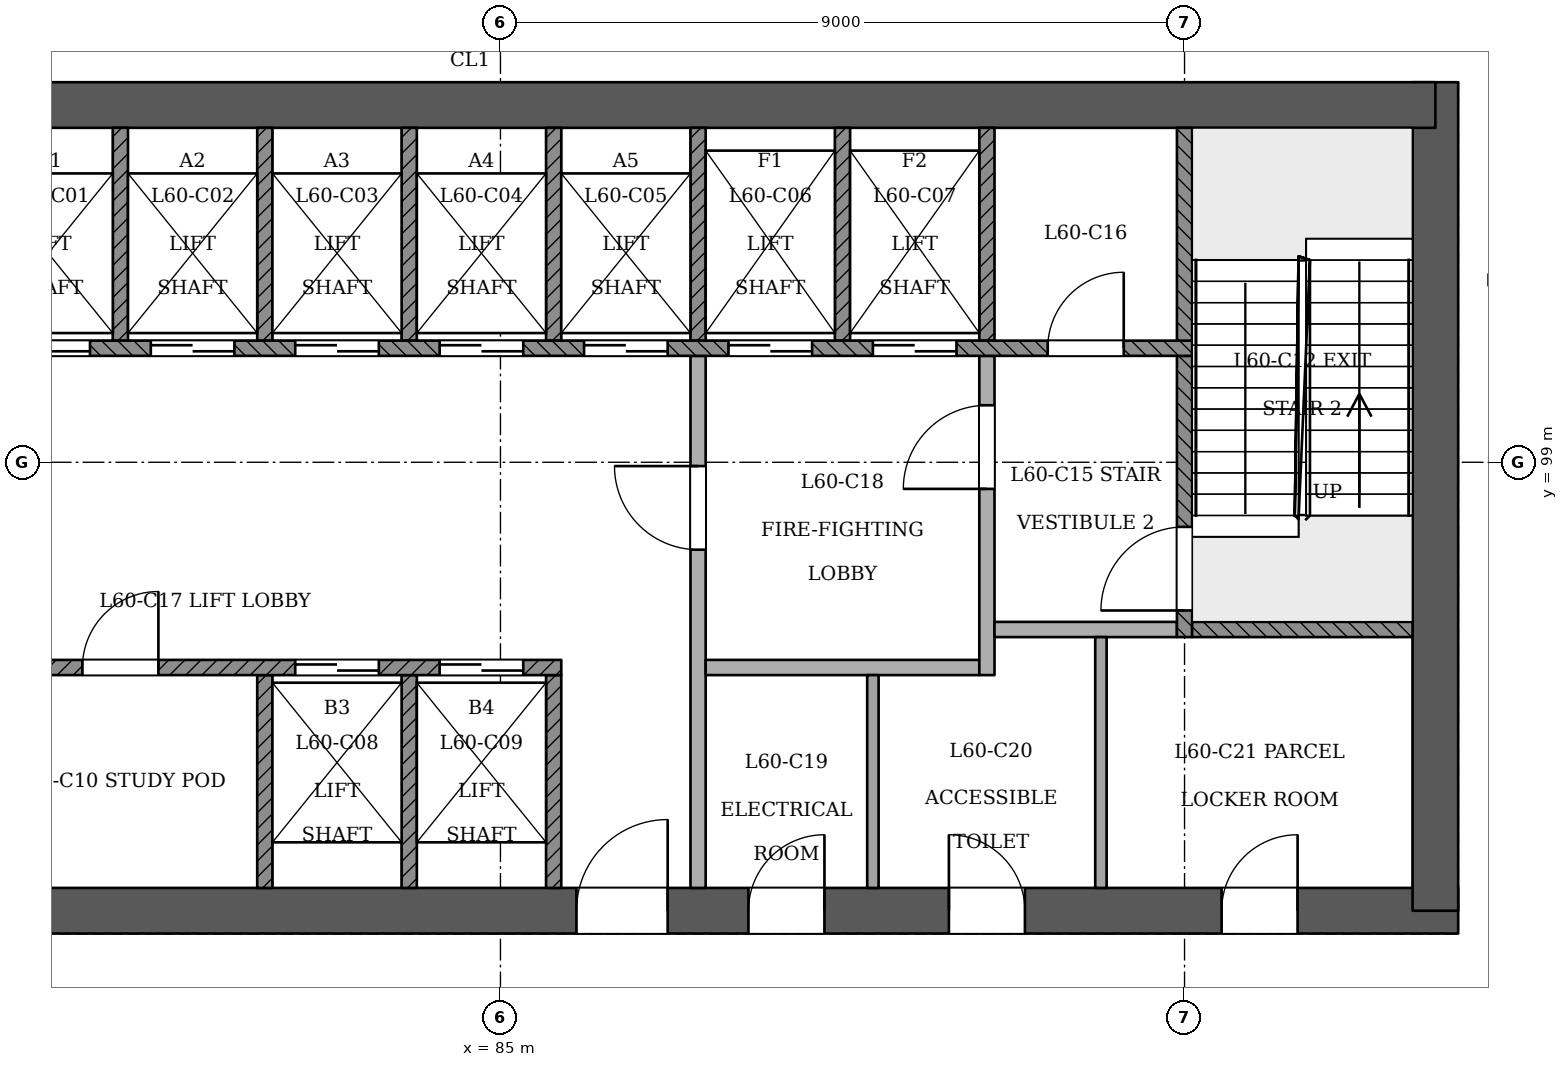
"""IFC4 building model, lengths in metres.
Left out: names, types, materials, properties, quantities, classifications, styles, units other than length and angle.
Written with IfcOpenShell. Run it as: python <this file> out.ifc"""

import sys

from ifc_helpers import new_model, si_unit, direction, frame, frame_2d, origin, place, context, subcontext, project, spatial, rectangle, extrude, element, fill, save


model = new_model("IFC4")
c1 = context("Model", 3, precision=1e-05, world=origin(), true_north=direction((0.0, 1.0)))
c2 = subcontext(c1, "Body", "Model", "MODEL_VIEW")
j1 = project(units=[si_unit("LENGTHUNIT", "METRE"), si_unit("PLANEANGLEUNIT", "RADIAN")], contexts=[c1])
p1 = place(None, origin())
s1 = spatial("IfcSite", under=j1, at=p1, CompositionType="ELEMENT")
p2 = place(p1, origin())
s2 = spatial("IfcBuilding", under=s1, at=p2, CompositionType="ELEMENT")
p3 = place(p2, frame((0.0, 0.0, 233.8)))
s3 = spatial("IfcBuildingStorey", under=s2, at=p3, CompositionType="ELEMENT", Elevation=233.8)
p4 = place(p3, frame((72.7, 93.1, 0.0), z_axis=(0.0, 0.0, 1.0), x_axis=(1.0, 0.0, 0.0)))
e1 = element("IfcWall", 1, at=p4, inside=s3, PredefinedType="SHEAR", context=c2, shape_type="SweptSolid", body=[
    extrude(rectangle(XDim=24.9, YDim=0.6, at=frame_2d((12.45, 0.0))), origin(), (0.0, 0.0, 1.0), 5.4),
])
p5 = place(p4, frame((1.1, 0.0, 0.0)))
e2 = element("IfcOpeningElement", 2, at=p5, cuts=e1, PredefinedType="OPENING", context=c2, shape_type="SweptSolid", body=[
    extrude(rectangle(XDim=1.2, YDim=2.1, at=frame_2d((0.6, 1.05))), frame((0.0, 0.311, 0.0), z_axis=(0.0, -1.0, 0.0), x_axis=(1.0, 0.0, 0.0)), (0.0, 0.0, 1.0), 0.621),
])
p6 = place(p4, frame((3.3, 0.0, 0.0)))
e3 = element("IfcOpeningElement", 3, at=p6, cuts=e1, PredefinedType="OPENING", context=c2, shape_type="SweptSolid", body=[
    extrude(rectangle(XDim=1.2, YDim=2.1, at=frame_2d((0.6, 1.05))), frame((0.0, 0.311, 0.0), z_axis=(0.0, -1.0, 0.0), x_axis=(1.0, 0.0, 0.0)), (0.0, 0.0, 1.0), 0.621),
])
p7 = place(p4, frame((13.3, 0.0, 0.0)))
e4 = element("IfcOpeningElement", 4, at=p7, cuts=e1, PredefinedType="OPENING", context=c2, shape_type="SweptSolid", body=[
    extrude(rectangle(XDim=1.2, YDim=2.1, at=frame_2d((0.6, 1.05))), frame((0.0, 0.311, 0.0), z_axis=(0.0, -1.0, 0.0), x_axis=(1.0, 0.0, 0.0)), (0.0, 0.0, 1.0), 0.621),
])
p8 = place(p4, frame((15.562, 0.0, 0.0)))
e5 = element("IfcOpeningElement", 5, at=p8, cuts=e1, PredefinedType="OPENING", context=c2, shape_type="SweptSolid", body=[
    extrude(rectangle(XDim=1.0, YDim=2.1, at=frame_2d((0.5, 1.05))), frame((0.0, 0.311, 0.0), z_axis=(0.0, -1.0, 0.0), x_axis=(1.0, 0.0, 0.0)), (0.0, 0.0, 1.0), 0.621),
])
p9 = place(p4, frame((18.2, 0.0, 0.0)))
e6 = element("IfcOpeningElement", 6, at=p9, cuts=e1, PredefinedType="OPENING", context=c2, shape_type="SweptSolid", body=[
    extrude(rectangle(XDim=1.0, YDim=2.1, at=frame_2d((0.5, 1.05))), frame((0.0, 0.311, 0.0), z_axis=(0.0, -1.0, 0.0), x_axis=(1.0, 0.0, 0.0)), (0.0, 0.0, 1.0), 0.621),
])
p10 = place(p4, frame((21.788, 0.0, 0.0)))
e7 = element("IfcOpeningElement", 7, at=p10, cuts=e1, PredefinedType="OPENING", context=c2, shape_type="SweptSolid", body=[
    extrude(rectangle(XDim=1.0, YDim=2.1, at=frame_2d((0.5, 1.05))), frame((0.0, 0.311, 0.0), z_axis=(0.0, -1.0, 0.0), x_axis=(1.0, 0.0, 0.0)), (0.0, 0.0, 1.0), 0.621),
])
p11 = place(p3, frame((97.3, 93.1, 0.0), z_axis=(0.0, 0.0, 1.0), x_axis=(0.0, 1.0, 0.0)))
e8 = element("IfcWall", 8, at=p11, inside=s3, PredefinedType="SHEAR", context=c2, shape_type="SweptSolid", body=[
    extrude(rectangle(XDim=10.9, YDim=0.6, at=frame_2d((5.45, 0.0))), origin(), (0.0, 0.0, 1.0), 5.4),
])
p12 = place(p3, frame((97.3, 103.7, 0.0), z_axis=(0.0, 0.0, 1.0), x_axis=(-1.0, 0.0, 0.0)))
e9 = element("IfcWall", 9, at=p12, inside=s3, PredefinedType="SHEAR", context=c2, shape_type="SweptSolid", body=[
    extrude(rectangle(XDim=24.9, YDim=0.6, at=frame_2d((12.45, 0.0))), origin(), (0.0, 0.0, 1.0), 5.4),
])
for number, where, z_axis, x_axis in (
    (10, (81.9, 93.4, 0.0), (0.0, 0.0, 1.0), (0.0, 1.0, 0.0)),
    (11, (83.8, 93.4, 0.0), (0.0, 0.0, 1.0), (0.0, 1.0, 0.0)),
    (12, (85.7, 93.4, 0.0), (0.0, 0.0, 1.0), (0.0, 1.0, 0.0)),
):
    element("IfcWall", number, at=place(p3, frame(where, z_axis=z_axis, x_axis=x_axis)), inside=s3, PredefinedType="SOLIDWALL", context=c2, shape_type="SweptSolid", body=[
        extrude(rectangle(XDim=2.8, YDim=0.2, at=frame_2d((1.4, 0.0))), origin(), (0.0, 0.0, 1.0), 5.0),
    ])
p13 = place(p3, frame((87.6, 93.4, 0.0), z_axis=(0.0, 0.0, 1.0), x_axis=(0.0, 1.0, 0.0)))
e13 = element("IfcWall", 13, at=p13, inside=s3, PredefinedType="PARTITIONING", context=c2, shape_type="SweptSolid", body=[
    extrude(rectangle(XDim=7.0, YDim=0.2, at=frame_2d((3.5, 0.0))), origin(), (0.0, 0.0, 1.0), 5.0),
])
p14 = place(p13, frame((4.45, 0.0, 0.0)))
e14 = element("IfcOpeningElement", 14, at=p14, cuts=e13, PredefinedType="OPENING", context=c2, shape_type="SweptSolid", body=[
    extrude(rectangle(XDim=1.1, YDim=2.1, at=frame_2d((0.55, 1.05))), frame((0.0, 0.11, 0.0), z_axis=(0.0, -1.0, 0.0), x_axis=(1.0, 0.0, 0.0)), (0.0, 0.0, 1.0), 0.221),
])
p15 = place(p3, frame((89.9, 93.4, 0.0), z_axis=(0.0, 0.0, 1.0), x_axis=(0.0, 1.0, 0.0)))
e15 = element("IfcWall", 15, at=p15, inside=s3, PredefinedType="PARTITIONING", context=c2, shape_type="SweptSolid", body=[
    extrude(rectangle(XDim=2.8, YDim=0.15, at=frame_2d((1.4, 0.0))), origin(), (0.0, 0.0, 1.0), 5.0),
])
p16 = place(p3, frame((92.9, 93.4, 0.0), z_axis=(0.0, 0.0, 1.0), x_axis=(0.0, 1.0, 0.0)))
e16 = element("IfcWall", 16, at=p16, inside=s3, PredefinedType="PARTITIONING", context=c2, shape_type="SweptSolid", body=[
    extrude(rectangle(XDim=3.3, YDim=0.15, at=frame_2d((1.65, 0.0))), origin(), (0.0, 0.0, 1.0), 5.0),
])
p17 = place(p3, frame((78.0, 96.3, 0.0), z_axis=(0.0, 0.0, 1.0), x_axis=(1.0, 0.0, 0.0)))
e17 = element("IfcWall", 17, at=p17, inside=s3, PredefinedType="SOLIDWALL", context=c2, shape_type="SweptSolid", body=[
    extrude(rectangle(XDim=7.8, YDim=0.2, at=frame_2d((3.9, 0.0))), origin(), (0.0, 0.0, 1.0), 5.0),
])
p18 = place(p17, frame((4.3, 0.0, 0.0)))
e18 = element("IfcOpeningElement", 18, at=p18, cuts=e17, PredefinedType="OPENING", context=c2, shape_type="SweptSolid", body=[
    extrude(rectangle(XDim=1.1, YDim=2.1, at=frame_2d((0.55, 1.05))), frame((0.0, 0.11, 0.0), z_axis=(0.0, -1.0, 0.0), x_axis=(1.0, 0.0, 0.0)), (0.0, 0.0, 1.0), 0.221),
])
p19 = place(p17, frame((6.2, 0.0, 0.0)))
e19 = element("IfcOpeningElement", 19, at=p19, cuts=e17, PredefinedType="OPENING", context=c2, shape_type="SweptSolid", body=[
    extrude(rectangle(XDim=1.1, YDim=2.1, at=frame_2d((0.55, 1.05))), frame((0.0, 0.11, 0.0), z_axis=(0.0, -1.0, 0.0), x_axis=(1.0, 0.0, 0.0)), (0.0, 0.0, 1.0), 0.221),
])
p20 = place(p17, frame((1.5, 0.0, 0.0)))
e20 = element("IfcOpeningElement", 20, at=p20, cuts=e17, PredefinedType="OPENING", context=c2, shape_type="SweptSolid", body=[
    extrude(rectangle(XDim=1.0, YDim=2.1, at=frame_2d((0.5, 1.05))), frame((0.0, 0.11, 0.0), z_axis=(0.0, -1.0, 0.0), x_axis=(1.0, 0.0, 0.0)), (0.0, 0.0, 1.0), 0.221),
])
p21 = place(p3, frame((87.7, 96.3, 0.0), z_axis=(0.0, 0.0, 1.0), x_axis=(1.0, 0.0, 0.0)))
e21 = element("IfcWall", 21, at=p21, inside=s3, PredefinedType="PARTITIONING", context=c2, shape_type="SweptSolid", body=[
    extrude(rectangle(XDim=3.6, YDim=0.2, at=frame_2d((1.8, 0.0))), origin(), (0.0, 0.0, 1.0), 5.0),
])
p22 = place(p3, frame((91.4, 96.2, 0.0), z_axis=(0.0, 0.0, 1.0), x_axis=(0.0, 1.0, 0.0)))
e22 = element("IfcWall", 22, at=p22, inside=s3, PredefinedType="PARTITIONING", context=c2, shape_type="SweptSolid", body=[
    extrude(rectangle(XDim=4.2, YDim=0.2, at=frame_2d((2.1, 0.0))), origin(), (0.0, 0.0, 1.0), 5.0),
])
p23 = place(p22, frame((2.45, 0.0, 0.0)))
e23 = element("IfcOpeningElement", 23, at=p23, cuts=e22, PredefinedType="OPENING", context=c2, shape_type="SweptSolid", body=[
    extrude(rectangle(XDim=1.1, YDim=2.1, at=frame_2d((0.55, 1.05))), frame((0.0, 0.11, 0.0), z_axis=(0.0, -1.0, 0.0), x_axis=(1.0, 0.0, 0.0)), (0.0, 0.0, 1.0), 0.221),
])
p24 = place(p3, frame((91.5, 96.8, 0.0), z_axis=(0.0, 0.0, 1.0), x_axis=(1.0, 0.0, 0.0)))
e24 = element("IfcWall", 24, at=p24, inside=s3, PredefinedType="PARTITIONING", context=c2, shape_type="SweptSolid", body=[
    extrude(rectangle(XDim=2.4, YDim=0.2, at=frame_2d((1.2, 0.0))), origin(), (0.0, 0.0, 1.0), 5.0),
])
p25 = place(p3, frame((94.0, 96.7, 0.0), z_axis=(0.0, 0.0, 1.0), x_axis=(0.0, 1.0, 0.0)))
e25 = element("IfcWall", 25, at=p25, inside=s3, PredefinedType="SOLIDWALL", context=c2, shape_type="SweptSolid", body=[
    extrude(rectangle(XDim=3.7, YDim=0.2, at=frame_2d((1.85, 0.0))), origin(), (0.0, 0.0, 1.0), 5.0),
])
p26 = place(p25, frame((0.35, 0.0, 0.0)))
e26 = element("IfcOpeningElement", 26, at=p26, cuts=e25, PredefinedType="OPENING", context=c2, shape_type="SweptSolid", body=[
    extrude(rectangle(XDim=1.1, YDim=2.1, at=frame_2d((0.55, 1.05))), frame((0.0, 0.11, 0.0), z_axis=(0.0, -1.0, 0.0), x_axis=(1.0, 0.0, 0.0)), (0.0, 0.0, 1.0), 0.221),
])
p27 = place(p3, frame((94.1, 96.8, 0.0), z_axis=(0.0, 0.0, 1.0), x_axis=(1.0, 0.0, 0.0)))
e27 = element("IfcWall", 27, at=p27, inside=s3, PredefinedType="SOLIDWALL", context=c2, shape_type="SweptSolid", body=[
    extrude(rectangle(XDim=2.9, YDim=0.2, at=frame_2d((1.45, 0.0))), origin(), (0.0, 0.0, 1.0), 5.0),
])
p28 = place(p3, frame((75.9, 100.5, 0.0), z_axis=(0.0, 0.0, 1.0), x_axis=(1.0, 0.0, 0.0)))
e28 = element("IfcWall", 28, at=p28, inside=s3, PredefinedType="SOLIDWALL", context=c2, shape_type="SweptSolid", body=[
    extrude(rectangle(XDim=18.2, YDim=0.2, at=frame_2d((9.1, 0.0))), origin(), (0.0, 0.0, 1.0), 5.0),
])
p29 = place(p28, frame((2.6, 0.0, 0.0)))
e29 = element("IfcOpeningElement", 29, at=p29, cuts=e28, PredefinedType="OPENING", context=c2, shape_type="SweptSolid", body=[
    extrude(rectangle(XDim=1.1, YDim=2.1, at=frame_2d((0.55, 1.05))), frame((0.0, 0.11, 0.0), z_axis=(0.0, -1.0, 0.0), x_axis=(1.0, 0.0, 0.0)), (0.0, 0.0, 1.0), 0.221),
])
p30 = place(p28, frame((4.5, 0.0, 0.0)))
e30 = element("IfcOpeningElement", 30, at=p30, cuts=e28, PredefinedType="OPENING", context=c2, shape_type="SweptSolid", body=[
    extrude(rectangle(XDim=1.1, YDim=2.1, at=frame_2d((0.55, 1.05))), frame((0.0, 0.11, 0.0), z_axis=(0.0, -1.0, 0.0), x_axis=(1.0, 0.0, 0.0)), (0.0, 0.0, 1.0), 0.221),
])
p31 = place(p28, frame((6.4, 0.0, 0.0)))
e31 = element("IfcOpeningElement", 31, at=p31, cuts=e28, PredefinedType="OPENING", context=c2, shape_type="SweptSolid", body=[
    extrude(rectangle(XDim=1.1, YDim=2.1, at=frame_2d((0.55, 1.05))), frame((0.0, 0.11, 0.0), z_axis=(0.0, -1.0, 0.0), x_axis=(1.0, 0.0, 0.0)), (0.0, 0.0, 1.0), 0.221),
])
p32 = place(p28, frame((8.3, 0.0, 0.0)))
e32 = element("IfcOpeningElement", 32, at=p32, cuts=e28, PredefinedType="OPENING", context=c2, shape_type="SweptSolid", body=[
    extrude(rectangle(XDim=1.1, YDim=2.1, at=frame_2d((0.55, 1.05))), frame((0.0, 0.11, 0.0), z_axis=(0.0, -1.0, 0.0), x_axis=(1.0, 0.0, 0.0)), (0.0, 0.0, 1.0), 0.221),
])
p33 = place(p28, frame((10.2, 0.0, 0.0)))
e33 = element("IfcOpeningElement", 33, at=p33, cuts=e28, PredefinedType="OPENING", context=c2, shape_type="SweptSolid", body=[
    extrude(rectangle(XDim=1.1, YDim=2.1, at=frame_2d((0.55, 1.05))), frame((0.0, 0.11, 0.0), z_axis=(0.0, -1.0, 0.0), x_axis=(1.0, 0.0, 0.0)), (0.0, 0.0, 1.0), 0.221),
])
p34 = place(p28, frame((12.1, 0.0, 0.0)))
e34 = element("IfcOpeningElement", 34, at=p34, cuts=e28, PredefinedType="OPENING", context=c2, shape_type="SweptSolid", body=[
    extrude(rectangle(XDim=1.1, YDim=2.1, at=frame_2d((0.55, 1.05))), frame((0.0, 0.11, 0.0), z_axis=(0.0, -1.0, 0.0), x_axis=(1.0, 0.0, 0.0)), (0.0, 0.0, 1.0), 0.221),
])
p35 = place(p28, frame((14.0, 0.0, 0.0)))
e35 = element("IfcOpeningElement", 35, at=p35, cuts=e28, PredefinedType="OPENING", context=c2, shape_type="SweptSolid", body=[
    extrude(rectangle(XDim=1.1, YDim=2.1, at=frame_2d((0.55, 1.05))), frame((0.0, 0.11, 0.0), z_axis=(0.0, -1.0, 0.0), x_axis=(1.0, 0.0, 0.0)), (0.0, 0.0, 1.0), 0.221),
])
p36 = place(p28, frame((0.65, 0.0, 0.0)))
e36 = element("IfcOpeningElement", 36, at=p36, cuts=e28, PredefinedType="OPENING", context=c2, shape_type="SweptSolid", body=[
    extrude(rectangle(XDim=1.0, YDim=2.1, at=frame_2d((0.5, 1.05))), frame((0.0, 0.11, 0.0), z_axis=(0.0, -1.0, 0.0), x_axis=(1.0, 0.0, 0.0)), (0.0, 0.0, 1.0), 0.221),
])
p37 = place(p28, frame((16.3, 0.0, 0.0)))
e37 = element("IfcOpeningElement", 37, at=p37, cuts=e28, PredefinedType="OPENING", context=c2, shape_type="SweptSolid", body=[
    extrude(rectangle(XDim=1.0, YDim=2.1, at=frame_2d((0.5, 1.05))), frame((0.0, 0.11, 0.0), z_axis=(0.0, -1.0, 0.0), x_axis=(1.0, 0.0, 0.0)), (0.0, 0.0, 1.0), 0.221),
])
for number, where, z_axis, x_axis in (
    (38, (80.0, 100.6, 0.0), (0.0, 0.0, 1.0), (0.0, 1.0, 0.0)),
    (39, (81.9, 100.6, 0.0), (0.0, 0.0, 1.0), (0.0, 1.0, 0.0)),
    (40, (83.8, 100.6, 0.0), (0.0, 0.0, 1.0), (0.0, 1.0, 0.0)),
    (41, (85.7, 100.6, 0.0), (0.0, 0.0, 1.0), (0.0, 1.0, 0.0)),
    (42, (87.6, 100.6, 0.0), (0.0, 0.0, 1.0), (0.0, 1.0, 0.0)),
    (43, (89.5, 100.6, 0.0), (0.0, 0.0, 1.0), (0.0, 1.0, 0.0)),
    (44, (91.4, 100.6, 0.0), (0.0, 0.0, 1.0), (0.0, 1.0, 0.0)),
    (45, (94.0, 100.6, 0.0), (0.0, 0.0, 1.0), (0.0, 1.0, 0.0)),
):
    element("IfcWall", number, at=place(p3, frame(where, z_axis=z_axis, x_axis=x_axis)), inside=s3, PredefinedType="SOLIDWALL", context=c2, shape_type="SweptSolid", body=[
        extrude(rectangle(XDim=2.8, YDim=0.2, at=frame_2d((1.4, 0.0))), origin(), (0.0, 0.0, 1.0), 5.0),
    ])
p38 = place(p29, origin())
e46 = element("IfcDoor", 46, at=p38, inside=s3, OperationType="SLIDING_TO_RIGHT", PredefinedType="NOTDEFINED", context=c2, shape_type="SweptSolid", body=[
    extrude(rectangle(XDim=1.1, YDim=2.1, at=frame_2d((0.55, 1.05))), frame((0.0, 0.025, 0.0), z_axis=(0.0, -1.0, 0.0), x_axis=(1.0, 0.0, 0.0)), (0.0, 0.0, 1.0), 0.05),
])
fill(e29, e46)
p39 = place(p30, origin())
e47 = element("IfcDoor", 47, at=p39, inside=s3, OperationType="SLIDING_TO_LEFT", PredefinedType="NOTDEFINED", context=c2, shape_type="SweptSolid", body=[
    extrude(rectangle(XDim=1.1, YDim=2.1, at=frame_2d((0.55, 1.05))), frame((0.0, 0.025, 0.0), z_axis=(0.0, -1.0, 0.0), x_axis=(1.0, 0.0, 0.0)), (0.0, 0.0, 1.0), 0.05),
])
fill(e30, e47)
p40 = place(p31, origin())
e48 = element("IfcDoor", 48, at=p40, inside=s3, OperationType="SLIDING_TO_RIGHT", PredefinedType="NOTDEFINED", context=c2, shape_type="SweptSolid", body=[
    extrude(rectangle(XDim=1.1, YDim=2.1, at=frame_2d((0.55, 1.05))), frame((0.0, 0.025, 0.0), z_axis=(0.0, -1.0, 0.0), x_axis=(1.0, 0.0, 0.0)), (0.0, 0.0, 1.0), 0.05),
])
fill(e31, e48)
p41 = place(p32, origin())
e49 = element("IfcDoor", 49, at=p41, inside=s3, OperationType="SLIDING_TO_LEFT", PredefinedType="NOTDEFINED", context=c2, shape_type="SweptSolid", body=[
    extrude(rectangle(XDim=1.1, YDim=2.1, at=frame_2d((0.55, 1.05))), frame((0.0, 0.025, 0.0), z_axis=(0.0, -1.0, 0.0), x_axis=(1.0, 0.0, 0.0)), (0.0, 0.0, 1.0), 0.05),
])
fill(e32, e49)
p42 = place(p33, origin())
e50 = element("IfcDoor", 50, at=p42, inside=s3, OperationType="SLIDING_TO_RIGHT", PredefinedType="NOTDEFINED", context=c2, shape_type="SweptSolid", body=[
    extrude(rectangle(XDim=1.1, YDim=2.1, at=frame_2d((0.55, 1.05))), frame((0.0, 0.025, 0.0), z_axis=(0.0, -1.0, 0.0), x_axis=(1.0, 0.0, 0.0)), (0.0, 0.0, 1.0), 0.05),
])
fill(e33, e50)
p43 = place(p18, origin())
e51 = element("IfcDoor", 51, at=p43, inside=s3, OperationType="SLIDING_TO_RIGHT", PredefinedType="NOTDEFINED", context=c2, shape_type="SweptSolid", body=[
    extrude(rectangle(XDim=1.1, YDim=2.1, at=frame_2d((0.55, 1.05))), frame((0.0, 0.025, 0.0), z_axis=(0.0, -1.0, 0.0), x_axis=(1.0, 0.0, 0.0)), (0.0, 0.0, 1.0), 0.05),
])
fill(e18, e51)
p44 = place(p19, origin())
e52 = element("IfcDoor", 52, at=p44, inside=s3, OperationType="SLIDING_TO_LEFT", PredefinedType="NOTDEFINED", context=c2, shape_type="SweptSolid", body=[
    extrude(rectangle(XDim=1.1, YDim=2.1, at=frame_2d((0.55, 1.05))), frame((0.0, 0.025, 0.0), z_axis=(0.0, -1.0, 0.0), x_axis=(1.0, 0.0, 0.0)), (0.0, 0.0, 1.0), 0.05),
])
fill(e19, e52)
p45 = place(p34, origin())
e53 = element("IfcDoor", 53, at=p45, inside=s3, OperationType="SLIDING_TO_RIGHT", PredefinedType="NOTDEFINED", context=c2, shape_type="SweptSolid", body=[
    extrude(rectangle(XDim=1.1, YDim=2.1, at=frame_2d((0.55, 1.05))), frame((0.0, 0.025, 0.0), z_axis=(0.0, -1.0, 0.0), x_axis=(1.0, 0.0, 0.0)), (0.0, 0.0, 1.0), 0.05),
])
fill(e34, e53)
p46 = place(p35, origin())
e54 = element("IfcDoor", 54, at=p46, inside=s3, OperationType="SLIDING_TO_LEFT", PredefinedType="NOTDEFINED", context=c2, shape_type="SweptSolid", body=[
    extrude(rectangle(XDim=1.1, YDim=2.1, at=frame_2d((0.55, 1.05))), frame((0.0, 0.025, 0.0), z_axis=(0.0, -1.0, 0.0), x_axis=(1.0, 0.0, 0.0)), (0.0, 0.0, 1.0), 0.05),
])
fill(e35, e54)
p47 = place(p26, origin())
e55 = element("IfcDoor", 55, at=p47, inside=s3, OperationType="SINGLE_SWING_LEFT", PredefinedType="NOTDEFINED", context=c2, shape_type="SweptSolid", body=[
    extrude(rectangle(XDim=1.1, YDim=2.1, at=frame_2d((0.55, 1.05))), frame((0.0, 0.025, 0.0), z_axis=(0.0, -1.0, 0.0), x_axis=(1.0, 0.0, 0.0)), (0.0, 0.0, 1.0), 0.05),
])
fill(e26, e55)
p48 = place(p14, origin())
e56 = element("IfcDoor", 56, at=p48, inside=s3, OperationType="SINGLE_SWING_RIGHT", PredefinedType="NOTDEFINED", context=c2, shape_type="SweptSolid", body=[
    extrude(rectangle(XDim=1.1, YDim=2.1, at=frame_2d((0.55, 1.05))), frame((0.0, 0.025, 0.0), z_axis=(0.0, -1.0, 0.0), x_axis=(1.0, 0.0, 0.0)), (0.0, 0.0, 1.0), 0.05),
])
fill(e14, e56)
p49 = place(p23, origin())
e57 = element("IfcDoor", 57, at=p49, inside=s3, OperationType="SINGLE_SWING_LEFT", PredefinedType="NOTDEFINED", context=c2, shape_type="SweptSolid", body=[
    extrude(rectangle(XDim=1.1, YDim=2.1, at=frame_2d((0.55, 1.05))), frame((0.0, 0.025, 0.0), z_axis=(0.0, -1.0, 0.0), x_axis=(1.0, 0.0, 0.0)), (0.0, 0.0, 1.0), 0.05),
])
fill(e23, e57)
p50 = place(p7, origin())
e58 = element("IfcDoor", 58, at=p50, inside=s3, OperationType="SINGLE_SWING_RIGHT", PredefinedType="NOTDEFINED", context=c2, shape_type="SweptSolid", body=[
    extrude(rectangle(XDim=1.2, YDim=2.1, at=frame_2d((0.6, 1.05))), frame((0.0, 0.025, 0.0), z_axis=(0.0, -1.0, 0.0), x_axis=(1.0, 0.0, 0.0)), (0.0, 0.0, 1.0), 0.05),
])
fill(e4, e58)
p51 = place(p37, origin())
e59 = element("IfcDoor", 59, at=p51, inside=s3, OperationType="SINGLE_SWING_RIGHT", PredefinedType="NOTDEFINED", context=c2, shape_type="SweptSolid", body=[
    extrude(rectangle(XDim=1.0, YDim=2.1, at=frame_2d((0.5, 1.05))), frame((0.0, 0.025, 0.0), z_axis=(0.0, -1.0, 0.0), x_axis=(1.0, 0.0, 0.0)), (0.0, 0.0, 1.0), 0.05),
])
fill(e37, e59)
p52 = place(p8, origin())
e60 = element("IfcDoor", 60, at=p52, inside=s3, OperationType="SINGLE_SWING_RIGHT", PredefinedType="NOTDEFINED", context=c2, shape_type="SweptSolid", body=[
    extrude(rectangle(XDim=1.0, YDim=2.1, at=frame_2d((0.5, 1.05))), frame((0.0, 0.025, 0.0), z_axis=(0.0, -1.0, 0.0), x_axis=(1.0, 0.0, 0.0)), (0.0, 0.0, 1.0), 0.05),
])
fill(e5, e60)
p53 = place(p9, origin())
e61 = element("IfcDoor", 61, at=p53, inside=s3, OperationType="SINGLE_SWING_LEFT", PredefinedType="NOTDEFINED", context=c2, shape_type="SweptSolid", body=[
    extrude(rectangle(XDim=1.0, YDim=2.1, at=frame_2d((0.5, 1.05))), frame((0.0, 0.025, 0.0), z_axis=(0.0, -1.0, 0.0), x_axis=(1.0, 0.0, 0.0)), (0.0, 0.0, 1.0), 0.05),
])
fill(e6, e61)
p54 = place(p10, origin())
e62 = element("IfcDoor", 62, at=p54, inside=s3, OperationType="SINGLE_SWING_RIGHT", PredefinedType="NOTDEFINED", context=c2, shape_type="SweptSolid", body=[
    extrude(rectangle(XDim=1.0, YDim=2.1, at=frame_2d((0.5, 1.05))), frame((0.0, 0.025, 0.0), z_axis=(0.0, -1.0, 0.0), x_axis=(1.0, 0.0, 0.0)), (0.0, 0.0, 1.0), 0.05),
])
fill(e7, e62)
p55 = place(p20, origin())
e63 = element("IfcDoor", 63, at=p55, inside=s3, OperationType="SINGLE_SWING_RIGHT", PredefinedType="NOTDEFINED", context=c2, shape_type="SweptSolid", body=[
    extrude(rectangle(XDim=1.0, YDim=2.1, at=frame_2d((0.5, 1.05))), frame((0.0, 0.025, 0.0), z_axis=(0.0, -1.0, 0.0), x_axis=(1.0, 0.0, 0.0)), (0.0, 0.0, 1.0), 0.05),
])
fill(e20, e63)
save(model, sys.argv[1])
